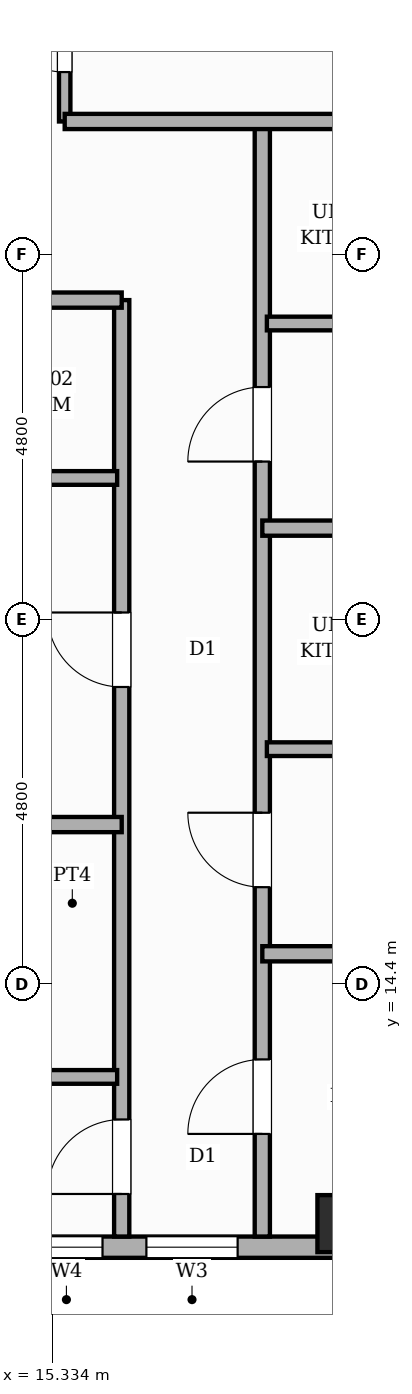
"""IFC4 building model, lengths in metres.
Left out: names, types, materials, properties, quantities, classifications, styles, units other than length and angle.
Written with IfcOpenShell. Run it as: python <this file> out.ifc"""

import sys

from ifc_helpers import new_model, si_unit, direction, frame, frame_2d, origin, origin_2d, place, context, subcontext, project, spatial, rectangle, extrude, element, fill, save


model = new_model("IFC4")
c1 = context("Model", 3, precision=1e-05, world=origin(), true_north=direction((0.0, 1.0)))
c2 = subcontext(c1, "Body", "Model", "MODEL_VIEW")
j1 = project(units=[si_unit("LENGTHUNIT", "METRE"), si_unit("PLANEANGLEUNIT", "RADIAN")], contexts=[c1])
p1 = place(None, origin())
s1 = spatial("IfcSite", under=j1, at=p1, CompositionType="ELEMENT")
p2 = place(p1, origin())
s2 = spatial("IfcBuilding", under=s1, at=p2, CompositionType="ELEMENT")
p3 = place(p2, frame((0.0, 0.0, 265.6)))
s3 = spatial("IfcBuildingStorey", under=s2, at=p3, CompositionType="ELEMENT", Elevation=265.6)
p4 = place(p3, frame((19.2, 11.25, 0.0), z_axis=(0.0, 0.0, 1.0), x_axis=(1.0, 0.0, 0.0)))
e1 = element("IfcColumn", 1, at=p4, inside=s3, PredefinedType="COLUMN", context=c2, shape_type="SweptSolid", body=[
    extrude(rectangle(XDim=0.75, YDim=0.75, at=origin_2d()), origin(), (0.0, 0.0, 1.0), 4.3),
])
p5 = place(p3, frame((21.6, 10.94, 0.0), z_axis=(0.0, 0.0, 1.0), x_axis=(-1.0, 0.0, 0.0)))
e2 = element("IfcWall", 2, at=p5, inside=s3, PredefinedType="STANDARD", context=c2, shape_type="SweptSolid", body=[
    extrude(rectangle(XDim=14.4, YDim=0.28, at=frame_2d((7.2, 0.0))), origin(), (0.0, 0.0, 1.0), 3.32),
])
p6 = place(p5, frame((5.603, 0.0, 0.8)))
e3 = element("IfcOpeningElement", 3, at=p6, cuts=e2, PredefinedType="OPENING", context=c2, shape_type="SweptSolid", body=[
    extrude(rectangle(XDim=0.95, YDim=1.8, at=frame_2d((0.475, 0.9))), frame((0.0, 0.15, 0.0), z_axis=(0.0, -1.0, 0.0), x_axis=(1.0, 0.0, 0.0)), (0.0, 0.0, 1.0), 0.3),
])
p7 = place(p5, frame((3.825, 0.0, 0.8)))
e4 = element("IfcOpeningElement", 4, at=p7, cuts=e2, PredefinedType="OPENING", context=c2, shape_type="SweptSolid", body=[
    extrude(rectangle(XDim=1.2, YDim=1.8, at=frame_2d((0.6, 0.9))), frame((0.0, 0.15, 0.0), z_axis=(0.0, -1.0, 0.0), x_axis=(1.0, 0.0, 0.0)), (0.0, 0.0, 1.0), 0.3),
])
p8 = place(p5, frame((0.433, 0.0, 0.8)))
e5 = element("IfcOpeningElement", 5, at=p8, cuts=e2, PredefinedType="OPENING", context=c2, shape_type="SweptSolid", body=[
    extrude(rectangle(XDim=1.2, YDim=1.8, at=frame_2d((0.6, 0.9))), frame((0.0, 0.15, 0.0), z_axis=(0.0, -1.0, 0.0), x_axis=(1.0, 0.0, 0.0)), (0.0, 0.0, 1.0), 0.3),
])
p9 = place(p3, frame((15.5, 25.75, 0.0), z_axis=(0.0, 0.0, 1.0), x_axis=(0.0, 1.0, 0.0)))
e6 = element("IfcWall", 6, at=p9, inside=s3, PredefinedType="PARTITIONING", context=c2, shape_type="SweptSolid", body=[
    extrude(rectangle(XDim=5.15, YDim=0.15, at=frame_2d((2.575, 0.0))), origin(), (0.0, 0.0, 1.0), 4.04),
])
p10 = place(p9, frame((0.65, 0.0, 0.0)))
e7 = element("IfcOpeningElement", 7, at=p10, cuts=e6, PredefinedType="OPENING", context=c2, shape_type="SweptSolid", body=[
    extrude(rectangle(XDim=0.95, YDim=2.15, at=frame_2d((0.475, 1.075))), frame((0.0, 0.085, 0.0), z_axis=(0.0, -1.0, 0.0), x_axis=(1.0, 0.0, 0.0)), (0.0, 0.0, 1.0), 0.17),
])
p11 = place(p9, frame((3.1, 0.0, 0.0)))
e8 = element("IfcOpeningElement", 8, at=p11, cuts=e6, PredefinedType="OPENING", context=c2, shape_type="SweptSolid", body=[
    extrude(rectangle(XDim=0.95, YDim=2.15, at=frame_2d((0.475, 1.075))), frame((0.0, 0.085, 0.0), z_axis=(0.0, -1.0, 0.0), x_axis=(1.0, 0.0, 0.0)), (0.0, 0.0, 1.0), 0.17),
])
p12 = place(p3, frame((16.25, 11.08, 0.0), z_axis=(0.0, 0.0, 1.0), x_axis=(0.0, 1.0, 0.0)))
e9 = element("IfcWall", 9, at=p12, inside=s3, PredefinedType="PARTITIONING", context=c2, shape_type="SweptSolid", body=[
    extrude(rectangle(XDim=12.32, YDim=0.2, at=frame_2d((6.16, 0.0))), origin(), (0.0, 0.0, 1.0), 4.04),
])
p13 = place(p12, frame((0.56, 0.0, 0.0)))
e10 = element("IfcOpeningElement", 10, at=p13, cuts=e9, PredefinedType="OPENING", context=c2, shape_type="SweptSolid", body=[
    extrude(rectangle(XDim=0.98, YDim=2.18, at=frame_2d((0.49, 1.09))), frame((0.0, 0.11, 0.0), z_axis=(0.0, -1.0, 0.0), x_axis=(1.0, 0.0, 0.0)), (0.0, 0.0, 1.0), 0.22),
])
p14 = place(p12, frame((7.23, 0.0, 0.0)))
e11 = element("IfcOpeningElement", 11, at=p14, cuts=e9, PredefinedType="OPENING", context=c2, shape_type="SweptSolid", body=[
    extrude(rectangle(XDim=0.98, YDim=2.18, at=frame_2d((0.49, 1.09))), frame((0.0, 0.11, 0.0), z_axis=(0.0, -1.0, 0.0), x_axis=(1.0, 0.0, 0.0)), (0.0, 0.0, 1.0), 0.22),
])
p15 = place(p3, frame((18.1, 11.08, 0.0), z_axis=(0.0, 0.0, 1.0), x_axis=(0.0, 1.0, 0.0)))
e12 = element("IfcWall", 12, at=p15, inside=s3, PredefinedType="PARTITIONING", context=c2, shape_type="SweptSolid", body=[
    extrude(rectangle(XDim=14.67, YDim=0.2, at=frame_2d((7.335, 0.0))), origin(), (0.0, 0.0, 1.0), 4.04),
])
p16 = place(p15, frame((1.35, 0.0, 0.0)))
e13 = element("IfcOpeningElement", 13, at=p16, cuts=e12, PredefinedType="OPENING", context=c2, shape_type="SweptSolid", body=[
    extrude(rectangle(XDim=0.98, YDim=2.18, at=frame_2d((0.49, 1.09))), frame((0.0, 0.11, 0.0), z_axis=(0.0, -1.0, 0.0), x_axis=(1.0, 0.0, 0.0)), (0.0, 0.0, 1.0), 0.22),
])
p17 = place(p15, frame((4.596, 0.0, 0.0)))
e14 = element("IfcOpeningElement", 14, at=p17, cuts=e12, PredefinedType="OPENING", context=c2, shape_type="SweptSolid", body=[
    extrude(rectangle(XDim=0.98, YDim=2.18, at=frame_2d((0.49, 1.09))), frame((0.0, 0.11, 0.0), z_axis=(0.0, -1.0, 0.0), x_axis=(1.0, 0.0, 0.0)), (0.0, 0.0, 1.0), 0.22),
])
p18 = place(p15, frame((10.196, 0.0, 0.0)))
e15 = element("IfcOpeningElement", 15, at=p18, cuts=e12, PredefinedType="OPENING", context=c2, shape_type="SweptSolid", body=[
    extrude(rectangle(XDim=0.98, YDim=2.18, at=frame_2d((0.49, 1.09))), frame((0.0, 0.11, 0.0), z_axis=(0.0, -1.0, 0.0), x_axis=(1.0, 0.0, 0.0)), (0.0, 0.0, 1.0), 0.22),
])
p19 = place(p3, frame((5.08, 23.4, 0.0), z_axis=(0.0, 0.0, 1.0), x_axis=(1.0, 0.0, 0.0)))
e16 = element("IfcWall", 16, at=p19, inside=s3, PredefinedType="PARTITIONING", context=c2, shape_type="SweptSolid", body=[
    extrude(rectangle(XDim=11.17, YDim=0.2, at=frame_2d((5.585, 0.0))), origin(), (0.0, 0.0, 1.0), 4.04),
])
p20 = place(p3, frame((15.5, 25.75, 0.0), z_axis=(0.0, 0.0, 1.0), x_axis=(1.0, 0.0, 0.0)))
e17 = element("IfcWall", 17, at=p20, inside=s3, PredefinedType="PARTITIONING", context=c2, shape_type="SweptSolid", body=[
    extrude(rectangle(XDim=8.22, YDim=0.2, at=frame_2d((4.11, 0.0))), origin(), (0.0, 0.0, 1.0), 4.04),
])
p21 = place(p3, frame((5.1, 13.18, 0.0), z_axis=(0.0, 0.0, 1.0), x_axis=(1.0, 0.0, 0.0)))
e18 = element("IfcWall", 18, at=p21, inside=s3, PredefinedType="PLUMBINGWALL", context=c2, shape_type="SweptSolid", body=[
    extrude(rectangle(XDim=11.09, YDim=0.18, at=frame_2d((5.545, 0.0))), origin(), (0.0, 0.0, 1.0), 4.04),
])
p22 = place(p21, frame((2.229, 0.0, 0.0)))
e19 = element("IfcOpeningElement", 19, at=p22, cuts=e18, PredefinedType="OPENING", context=c2, shape_type="SweptSolid", body=[
    extrude(rectangle(XDim=0.86, YDim=2.1, at=frame_2d((0.43, 1.05))), frame((0.0, 0.1, 0.0), z_axis=(0.0, -1.0, 0.0), x_axis=(1.0, 0.0, 0.0)), (0.0, 0.0, 1.0), 0.2),
])
p23 = place(p21, frame((7.844, 0.0, 0.0)))
e20 = element("IfcOpeningElement", 20, at=p23, cuts=e18, PredefinedType="OPENING", context=c2, shape_type="SweptSolid", body=[
    extrude(rectangle(XDim=0.86, YDim=2.1, at=frame_2d((0.43, 1.05))), frame((0.0, 0.1, 0.0), z_axis=(0.0, -1.0, 0.0), x_axis=(1.0, 0.0, 0.0)), (0.0, 0.0, 1.0), 0.2),
])
p24 = place(p3, frame((5.08, 16.5, 0.0), z_axis=(0.0, 0.0, 1.0), x_axis=(1.0, 0.0, 0.0)))
e21 = element("IfcWall", 21, at=p24, inside=s3, PredefinedType="SOLIDWALL", context=c2, shape_type="SweptSolid", body=[
    extrude(rectangle(XDim=11.17, YDim=0.2, at=frame_2d((5.585, 0.0))), origin(), (0.0, 0.0, 1.0), 4.04),
])
p25 = place(p3, frame((5.08, 21.06, 0.0), z_axis=(0.0, 0.0, 1.0), x_axis=(1.0, 0.0, 0.0)))
e22 = element("IfcWall", 22, at=p25, inside=s3, PredefinedType="PLUMBINGWALL", context=c2, shape_type="SweptSolid", body=[
    extrude(rectangle(XDim=11.11, YDim=0.18, at=frame_2d((5.555, 0.0))), origin(), (0.0, 0.0, 1.0), 4.04),
])
p26 = place(p25, frame((1.611, 0.0, 0.0)))
e23 = element("IfcOpeningElement", 23, at=p26, cuts=e22, PredefinedType="OPENING", context=c2, shape_type="SweptSolid", body=[
    extrude(rectangle(XDim=0.9, YDim=2.15, at=frame_2d((0.45, 1.075))), frame((0.0, 0.1, 0.0), z_axis=(0.0, -1.0, 0.0), x_axis=(1.0, 0.0, 0.0)), (0.0, 0.0, 1.0), 0.2),
])
p27 = place(p25, frame((5.874, 0.0, 0.0)))
e24 = element("IfcOpeningElement", 24, at=p27, cuts=e22, PredefinedType="OPENING", context=c2, shape_type="SweptSolid", body=[
    extrude(rectangle(XDim=0.9, YDim=2.15, at=frame_2d((0.45, 1.075))), frame((0.0, 0.1, 0.0), z_axis=(0.0, -1.0, 0.0), x_axis=(1.0, 0.0, 0.0)), (0.0, 0.0, 1.0), 0.2),
])
p28 = place(p25, frame((9.038, 0.0, 0.0)))
e25 = element("IfcOpeningElement", 25, at=p28, cuts=e22, PredefinedType="OPENING", context=c2, shape_type="SweptSolid", body=[
    extrude(rectangle(XDim=0.86, YDim=2.1, at=frame_2d((0.43, 1.05))), frame((0.0, 0.1, 0.0), z_axis=(0.0, -1.0, 0.0), x_axis=(1.0, 0.0, 0.0)), (0.0, 0.0, 1.0), 0.2),
])
p29 = place(p3, frame((18.1, 14.8, 0.0), z_axis=(0.0, 0.0, 1.0), x_axis=(1.0, 0.0, 0.0)))
e26 = element("IfcWall", 26, at=p29, inside=s3, PredefinedType="SOLIDWALL", context=c2, shape_type="SweptSolid", body=[
    extrude(rectangle(XDim=5.62, YDim=0.2, at=frame_2d((2.81, 0.0))), origin(), (0.0, 0.0, 1.0), 4.04),
])
p30 = place(p3, frame((18.16, 17.492, 0.0), z_axis=(0.0, 0.0, 1.0), x_axis=(1.0, 0.0, 0.0)))
e27 = element("IfcWall", 27, at=p30, inside=s3, PredefinedType="PLUMBINGWALL", context=c2, shape_type="SweptSolid", body=[
    extrude(rectangle(XDim=5.56, YDim=0.18, at=frame_2d((2.78, 0.0))), origin(), (0.0, 0.0, 1.0), 4.04),
])
p31 = place(p30, frame((0.876, 0.0, 0.0)))
e28 = element("IfcOpeningElement", 28, at=p31, cuts=e27, PredefinedType="OPENING", context=c2, shape_type="SweptSolid", body=[
    extrude(rectangle(XDim=0.86, YDim=2.1, at=frame_2d((0.43, 1.05))), frame((0.0, 0.1, 0.0), z_axis=(0.0, -1.0, 0.0), x_axis=(1.0, 0.0, 0.0)), (0.0, 0.0, 1.0), 0.2),
])
p32 = place(p30, frame((3.716, 0.0, 0.0)))
e29 = element("IfcOpeningElement", 29, at=p32, cuts=e27, PredefinedType="OPENING", context=c2, shape_type="SweptSolid", body=[
    extrude(rectangle(XDim=0.86, YDim=2.1, at=frame_2d((0.43, 1.05))), frame((0.0, 0.1, 0.0), z_axis=(0.0, -1.0, 0.0), x_axis=(1.0, 0.0, 0.0)), (0.0, 0.0, 1.0), 0.2),
])
p33 = place(p3, frame((18.1, 20.4, 0.0), z_axis=(0.0, 0.0, 1.0), x_axis=(1.0, 0.0, 0.0)))
e30 = element("IfcWall", 30, at=p33, inside=s3, PredefinedType="SOLIDWALL", context=c2, shape_type="SweptSolid", body=[
    extrude(rectangle(XDim=5.62, YDim=0.2, at=frame_2d((2.81, 0.0))), origin(), (0.0, 0.0, 1.0), 4.04),
])
p34 = place(p3, frame((18.16, 23.092, 0.0), z_axis=(0.0, 0.0, 1.0), x_axis=(1.0, 0.0, 0.0)))
e31 = element("IfcWall", 31, at=p34, inside=s3, PredefinedType="PLUMBINGWALL", context=c2, shape_type="SweptSolid", body=[
    extrude(rectangle(XDim=5.56, YDim=0.18, at=frame_2d((2.78, 0.0))), origin(), (0.0, 0.0, 1.0), 4.04),
])
p35 = place(p34, frame((0.876, 0.0, 0.0)))
e32 = element("IfcOpeningElement", 32, at=p35, cuts=e31, PredefinedType="OPENING", context=c2, shape_type="SweptSolid", body=[
    extrude(rectangle(XDim=0.86, YDim=2.1, at=frame_2d((0.43, 1.05))), frame((0.0, 0.1, 0.0), z_axis=(0.0, -1.0, 0.0), x_axis=(1.0, 0.0, 0.0)), (0.0, 0.0, 1.0), 0.2),
])
p36 = place(p34, frame((3.716, 0.0, 0.0)))
e33 = element("IfcOpeningElement", 33, at=p36, cuts=e31, PredefinedType="OPENING", context=c2, shape_type="SweptSolid", body=[
    extrude(rectangle(XDim=0.86, YDim=2.1, at=frame_2d((0.43, 1.05))), frame((0.0, 0.1, 0.0), z_axis=(0.0, -1.0, 0.0), x_axis=(1.0, 0.0, 0.0)), (0.0, 0.0, 1.0), 0.2),
])
p37 = place(p6, origin())
e34 = element("IfcWindow", 34, at=p37, inside=s3, PartitioningType="SINGLE_PANEL", PredefinedType="WINDOW", context=c2, shape_type="SweptSolid", body=[
    extrude(rectangle(XDim=0.95, YDim=1.8, at=frame_2d((0.475, 0.9))), frame((0.0, 0.03, 0.0), z_axis=(0.0, -1.0, 0.0), x_axis=(1.0, 0.0, 0.0)), (0.0, 0.0, 1.0), 0.06),
])
fill(e3, e34)
p38 = place(p7, origin())
e35 = element("IfcWindow", 35, at=p38, inside=s3, PartitioningType="SINGLE_PANEL", PredefinedType="WINDOW", context=c2, shape_type="SweptSolid", body=[
    extrude(rectangle(XDim=1.2, YDim=1.8, at=frame_2d((0.6, 0.9))), frame((0.0, 0.03, 0.0), z_axis=(0.0, -1.0, 0.0), x_axis=(1.0, 0.0, 0.0)), (0.0, 0.0, 1.0), 0.06),
])
fill(e4, e35)
p39 = place(p10, origin())
e36 = element("IfcDoor", 36, at=p39, inside=s3, OperationType="SINGLE_SWING_RIGHT", PredefinedType="DOOR", context=c2, shape_type="SweptSolid", body=[
    extrude(rectangle(XDim=0.95, YDim=2.15, at=frame_2d((0.475, 1.075))), frame((0.0, 0.025, 0.0), z_axis=(0.0, -1.0, 0.0), x_axis=(1.0, 0.0, 0.0)), (0.0, 0.0, 1.0), 0.05),
])
fill(e7, e36)
p40 = place(p13, origin())
e37 = element("IfcDoor", 37, at=p40, inside=s3, OperationType="SINGLE_SWING_LEFT", PredefinedType="DOOR", context=c2, shape_type="SweptSolid", body=[
    extrude(rectangle(XDim=0.98, YDim=2.18, at=frame_2d((0.49, 1.09))), frame((0.0, 0.025, 0.0), z_axis=(0.0, -1.0, 0.0), x_axis=(1.0, 0.0, 0.0)), (0.0, 0.0, 1.0), 0.05),
])
fill(e10, e37)
p41 = place(p14, origin())
e38 = element("IfcDoor", 38, at=p41, inside=s3, OperationType="SINGLE_SWING_RIGHT", PredefinedType="DOOR", context=c2, shape_type="SweptSolid", body=[
    extrude(rectangle(XDim=0.98, YDim=2.18, at=frame_2d((0.49, 1.09))), frame((0.0, 0.025, 0.0), z_axis=(0.0, -1.0, 0.0), x_axis=(1.0, 0.0, 0.0)), (0.0, 0.0, 1.0), 0.05),
])
fill(e11, e38)
p42 = place(p16, origin())
e39 = element("IfcDoor", 39, at=p42, inside=s3, OperationType="SINGLE_SWING_LEFT", PredefinedType="DOOR", context=c2, shape_type="SweptSolid", body=[
    extrude(rectangle(XDim=0.98, YDim=2.18, at=frame_2d((0.49, 1.09))), frame((0.0, 0.025, 0.0), z_axis=(0.0, -1.0, 0.0), x_axis=(1.0, 0.0, 0.0)), (0.0, 0.0, 1.0), 0.05),
])
fill(e13, e39)
p43 = place(p17, origin())
e40 = element("IfcDoor", 40, at=p43, inside=s3, OperationType="SINGLE_SWING_RIGHT", PredefinedType="DOOR", context=c2, shape_type="SweptSolid", body=[
    extrude(rectangle(XDim=0.98, YDim=2.18, at=frame_2d((0.49, 1.09))), frame((0.0, 0.025, 0.0), z_axis=(0.0, -1.0, 0.0), x_axis=(1.0, 0.0, 0.0)), (0.0, 0.0, 1.0), 0.05),
])
fill(e14, e40)
p44 = place(p18, origin())
e41 = element("IfcDoor", 41, at=p44, inside=s3, OperationType="SINGLE_SWING_LEFT", PredefinedType="DOOR", context=c2, shape_type="SweptSolid", body=[
    extrude(rectangle(XDim=0.98, YDim=2.18, at=frame_2d((0.49, 1.09))), frame((0.0, 0.025, 0.0), z_axis=(0.0, -1.0, 0.0), x_axis=(1.0, 0.0, 0.0)), (0.0, 0.0, 1.0), 0.05),
])
fill(e15, e41)
save(model, sys.argv[1])
